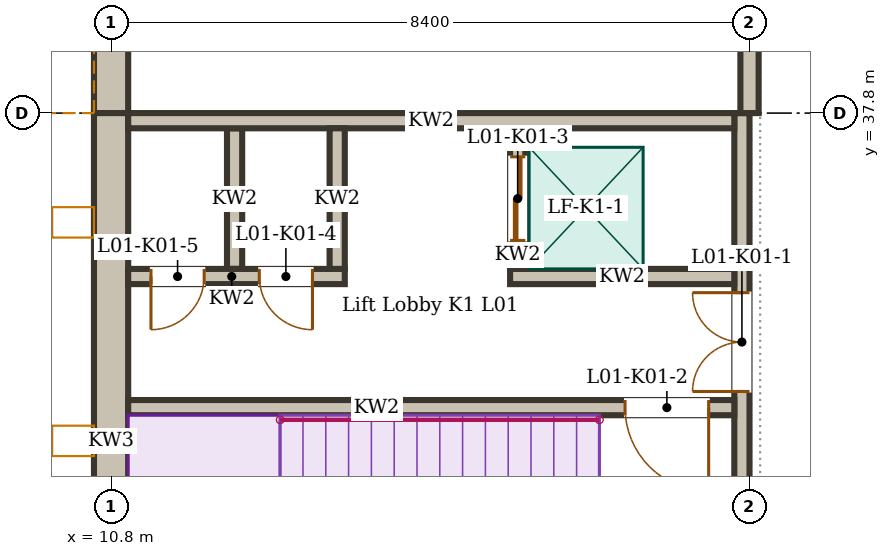
"""IFC4 building model, lengths in metres.
Left out: names, types, materials, properties, quantities, classifications, styles, units other than length and angle.
Written with IfcOpenShell. Run it as: python <this file> out.ifc"""

import sys

from ifc_helpers import new_model, si_unit, direction, frame, frame_2d, origin, place, context, subcontext, project, spatial, rectangle, extrude, element, fill, save


model = new_model("IFC4")
c1 = context("Model", 3, precision=1e-05, world=origin(), true_north=direction((0.0, 1.0)))
c2 = subcontext(c1, "Body", "Model", "MODEL_VIEW")
j1 = project(units=[si_unit("LENGTHUNIT", "METRE"), si_unit("PLANEANGLEUNIT", "RADIAN")], contexts=[c1])
p1 = place(None, origin())
s1 = spatial("IfcSite", under=j1, at=p1, CompositionType="ELEMENT")
p2 = place(p1, origin())
s2 = spatial("IfcBuilding", under=s1, at=p2, CompositionType="ELEMENT")
p3 = place(p2, frame((0.0, 0.0, 4.5)))
s3 = spatial("IfcBuildingStorey", under=s2, at=p3, CompositionType="ELEMENT", Elevation=4.5)
p4 = place(p3, frame((10.8, 37.8, 0.0), z_axis=(0.0, 0.0, 1.0), x_axis=(0.0, 1.0, 0.0)))
e1 = element("IfcWall", 1, at=p4, inside=s3, PredefinedType="SOLIDWALL", context=c2, shape_type="SweptSolid", body=[
    extrude(rectangle(XDim=8.255, YDim=0.45, at=frame_2d((4.127, 0.0))), origin(), (0.0, 0.0, 1.0), 4.05),
])
p5 = place(p4, frame((1.1, 0.0, 2.1)))
e2 = element("IfcOpeningElement", 2, at=p5, cuts=e1, PredefinedType="OPENING", context=c2, shape_type="SweptSolid", body=[
    extrude(rectangle(XDim=0.6, YDim=1.2, at=frame_2d((0.3, 0.6))), frame((0.0, 0.235, 0.0), z_axis=(0.0, -1.0, 0.0), x_axis=(1.0, 0.0, 0.0)), (0.0, 0.0, 1.0), 0.47),
])
p6 = place(p4, frame((3.9, 0.0, 2.1)))
e3 = element("IfcOpeningElement", 3, at=p6, cuts=e1, PredefinedType="OPENING", context=c2, shape_type="SweptSolid", body=[
    extrude(rectangle(XDim=0.6, YDim=1.2, at=frame_2d((0.3, 0.6))), frame((0.0, 0.235, 0.0), z_axis=(0.0, -1.0, 0.0), x_axis=(1.0, 0.0, 0.0)), (0.0, 0.0, 1.0), 0.47),
])
p7 = place(p4, frame((6.7, 0.0, 2.1)))
e4 = element("IfcOpeningElement", 4, at=p7, cuts=e1, PredefinedType="OPENING", context=c2, shape_type="SweptSolid", body=[
    extrude(rectangle(XDim=0.6, YDim=1.2, at=frame_2d((0.3, 0.6))), frame((0.0, 0.235, 0.0), z_axis=(0.0, -1.0, 0.0), x_axis=(1.0, 0.0, 0.0)), (0.0, 0.0, 1.0), 0.47),
])
p8 = place(p3, frame((19.2, 37.8, 0.0), z_axis=(0.0, 0.0, 1.0), x_axis=(0.0, 1.0, 0.0)))
e5 = element("IfcWall", 5, at=p8, inside=s3, PredefinedType="SOLIDWALL", context=c2, shape_type="SweptSolid", body=[
    extrude(rectangle(XDim=5.48, YDim=0.24, at=frame_2d((2.74, 0.0))), origin(), (0.0, 0.0, 1.0), 4.044),
])
p9 = place(p8, frame((2.2, 0.0, 0.0)))
e6 = element("IfcOpeningElement", 6, at=p9, cuts=e5, PredefinedType="OPENING", context=c2, shape_type="SweptSolid", body=[
    extrude(rectangle(XDim=1.2, YDim=2.1, at=frame_2d((0.6, 1.05))), frame((0.0, 0.13, 0.0), z_axis=(0.0, -1.0, 0.0), x_axis=(1.0, 0.0, 0.0)), (0.0, 0.0, 1.0), 0.26),
])
p10 = place(p3, frame((19.1, 29.625, 0.0), z_axis=(0.0, 0.0, 1.0), x_axis=(0.0, 1.0, 0.0)))
e7 = element("IfcWall", 7, at=p10, inside=s3, PredefinedType="SOLIDWALL", context=c2, shape_type="SweptSolid", body=[
    extrude(rectangle(XDim=8.175, YDim=0.2, at=frame_2d((4.087, 0.0))), origin(), (0.0, 0.0, 1.0), 4.5),
])
p11 = place(p10, frame((4.512, 0.0, 0.0)))
e8 = element("IfcOpeningElement", 8, at=p11, cuts=e7, PredefinedType="OPENING", context=c2, shape_type="SweptSolid", body=[
    extrude(rectangle(XDim=1.3, YDim=2.1, at=frame_2d((0.65, 1.05))), frame((0.0, 0.11, 0.0), z_axis=(0.0, -1.0, 0.0), x_axis=(1.0, 0.0, 0.0)), (0.0, 0.0, 1.0), 0.22),
])
p12 = place(p3, frame((10.8, 29.175, 0.0), z_axis=(0.0, 0.0, 1.0), x_axis=(0.0, 1.0, 0.0)))
e9 = element("IfcWall", 9, at=p12, inside=s3, PredefinedType="SOLIDWALL", context=c2, shape_type="SweptSolid", body=[
    extrude(rectangle(XDim=8.625, YDim=0.45, at=frame_2d((4.312, 0.0))), origin(), (0.0, 0.0, 1.0), 4.5),
])
p13 = place(p3, frame((19.0, 37.7, 0.0), z_axis=(0.0, 0.0, 1.0), x_axis=(-1.0, 0.0, 0.0)))
e10 = element("IfcWall", 10, at=p13, inside=s3, PredefinedType="SOLIDWALL", context=c2, shape_type="SweptSolid", body=[
    extrude(rectangle(XDim=7.975, YDim=0.2, at=frame_2d((3.988, 0.0))), origin(), (0.0, 0.0, 1.0), 4.5),
])
p14 = place(p3, frame((19.0, 33.925, 0.0), z_axis=(0.0, 0.0, 1.0), x_axis=(-1.0, 0.0, 0.0)))
e11 = element("IfcWall", 11, at=p14, inside=s3, PredefinedType="SOLIDWALL", context=c2, shape_type="SweptSolid", body=[
    extrude(rectangle(XDim=7.975, YDim=0.2, at=frame_2d((3.988, 0.0))), origin(), (0.0, 0.0, 1.0), 4.5),
])
p15 = place(p14, frame((0.337, 0.0, 0.0)))
e12 = element("IfcOpeningElement", 12, at=p15, cuts=e11, PredefinedType="OPENING", context=c2, shape_type="SweptSolid", body=[
    extrude(rectangle(XDim=1.1, YDim=2.1, at=frame_2d((0.55, 1.05))), frame((0.0, 0.11, 0.0), z_axis=(0.0, -1.0, 0.0), x_axis=(1.0, 0.0, 0.0)), (0.0, 0.0, 1.0), 0.22),
])
p16 = place(p3, frame((19.0, 35.65, 0.0), z_axis=(0.0, 0.0, 1.0), x_axis=(-1.0, 0.0, 0.0)))
e13 = element("IfcWall", 13, at=p16, inside=s3, PredefinedType="SOLIDWALL", context=c2, shape_type="SweptSolid", body=[
    extrude(rectangle(XDim=2.95, YDim=0.2, at=frame_2d((1.475, 0.0))), origin(), (0.0, 0.0, 1.0), 4.5),
])
p17 = place(p3, frame((13.875, 35.65, 0.0), z_axis=(0.0, 0.0, 1.0), x_axis=(-1.0, 0.0, 0.0)))
e14 = element("IfcWall", 14, at=p17, inside=s3, PredefinedType="SOLIDWALL", context=c2, shape_type="SweptSolid", body=[
    extrude(rectangle(XDim=2.85, YDim=0.2, at=frame_2d((1.425, 0.0))), origin(), (0.0, 0.0, 1.0), 4.3),
])
p18 = place(p17, frame((0.425, 0.0, 0.0)))
e15 = element("IfcOpeningElement", 15, at=p18, cuts=e14, PredefinedType="OPENING", context=c2, shape_type="SweptSolid", body=[
    extrude(rectangle(XDim=0.7, YDim=2.1, at=frame_2d((0.35, 1.05))), frame((0.0, 0.11, 0.0), z_axis=(0.0, -1.0, 0.0), x_axis=(1.0, 0.0, 0.0)), (0.0, 0.0, 1.0), 0.22),
])
p19 = place(p17, frame((1.85, 0.0, 0.0)))
e16 = element("IfcOpeningElement", 16, at=p19, cuts=e14, PredefinedType="OPENING", context=c2, shape_type="SweptSolid", body=[
    extrude(rectangle(XDim=0.7, YDim=2.1, at=frame_2d((0.35, 1.05))), frame((0.0, 0.11, 0.0), z_axis=(0.0, -1.0, 0.0), x_axis=(1.0, 0.0, 0.0)), (0.0, 0.0, 1.0), 0.22),
])
p20 = place(p3, frame((16.15, 35.75, 0.0), z_axis=(0.0, 0.0, 1.0), x_axis=(0.0, 1.0, 0.0)))
e17 = element("IfcWall", 17, at=p20, inside=s3, PredefinedType="SOLIDWALL", context=c2, shape_type="SweptSolid", body=[
    extrude(rectangle(XDim=1.85, YDim=0.2, at=frame_2d((0.925, 0.0))), origin(), (0.0, 0.0, 1.0), 4.5),
])
p21 = place(p20, frame((0.375, 0.0, 0.0)))
e18 = element("IfcOpeningElement", 18, at=p21, cuts=e17, PredefinedType="OPENING", context=c2, shape_type="SweptSolid", body=[
    extrude(rectangle(XDim=1.1, YDim=2.1, at=frame_2d((0.55, 1.05))), frame((0.0, 0.11, 0.0), z_axis=(0.0, -1.0, 0.0), x_axis=(1.0, 0.0, 0.0)), (0.0, 0.0, 1.0), 0.22),
])
for number, where, z_axis, x_axis in (
    (19, (13.775, 35.75, 0.0), (0.0, 0.0, 1.0), (0.0, 1.0, 0.0)),
    (20, (12.425, 35.75, 0.0), (0.0, 0.0, 1.0), (0.0, 1.0, 0.0)),
):
    element("IfcWall", number, at=place(p3, frame(where, z_axis=z_axis, x_axis=x_axis)), inside=s3, PredefinedType="SOLIDWALL", context=c2, shape_type="SweptSolid", body=[
        extrude(rectangle(XDim=1.85, YDim=0.2, at=frame_2d((0.925, 0.0))), origin(), (0.0, 0.0, 1.0), 4.3),
    ])
p22 = place(p11, origin())
e21 = element("IfcDoor", 21, at=p22, inside=s3, OperationType="DOUBLE_DOOR_DOUBLE_SWING", PredefinedType="DOOR", context=c2, shape_type="SweptSolid", body=[
    extrude(rectangle(XDim=1.3, YDim=2.1, at=frame_2d((0.65, 1.05))), frame((0.0, 0.025, 0.0), z_axis=(0.0, -1.0, 0.0), x_axis=(1.0, 0.0, 0.0)), (0.0, 0.0, 1.0), 0.05),
])
fill(e8, e21)
p23 = place(p15, origin())
e22 = element("IfcDoor", 22, at=p23, inside=s3, OperationType="SINGLE_SWING_LEFT", PredefinedType="DOOR", context=c2, shape_type="SweptSolid", body=[
    extrude(rectangle(XDim=1.1, YDim=2.1, at=frame_2d((0.55, 1.05))), frame((0.0, 0.025, 0.0), z_axis=(0.0, -1.0, 0.0), x_axis=(1.0, 0.0, 0.0)), (0.0, 0.0, 1.0), 0.05),
])
fill(e12, e22)
p24 = place(p21, origin())
e23 = element("IfcDoor", 23, at=p24, inside=s3, OperationType="DOUBLE_DOOR_SLIDING", PredefinedType="DOOR", context=c2, shape_type="SweptSolid", body=[
    extrude(rectangle(XDim=1.1, YDim=2.1, at=frame_2d((0.55, 1.05))), frame((0.0, 0.025, 0.0), z_axis=(0.0, -1.0, 0.0), x_axis=(1.0, 0.0, 0.0)), (0.0, 0.0, 1.0), 0.05),
])
fill(e18, e23)
p25 = place(p18, origin())
e24 = element("IfcDoor", 24, at=p25, inside=s3, OperationType="SINGLE_SWING_LEFT", PredefinedType="DOOR", context=c2, shape_type="SweptSolid", body=[
    extrude(rectangle(XDim=0.7, YDim=2.1, at=frame_2d((0.35, 1.05))), frame((0.0, 0.025, 0.0), z_axis=(0.0, -1.0, 0.0), x_axis=(1.0, 0.0, 0.0)), (0.0, 0.0, 1.0), 0.05),
])
fill(e15, e24)
p26 = place(p19, origin())
e25 = element("IfcDoor", 25, at=p26, inside=s3, OperationType="SINGLE_SWING_RIGHT", PredefinedType="DOOR", context=c2, shape_type="SweptSolid", body=[
    extrude(rectangle(XDim=0.7, YDim=2.1, at=frame_2d((0.35, 1.05))), frame((0.0, 0.025, 0.0), z_axis=(0.0, -1.0, 0.0), x_axis=(1.0, 0.0, 0.0)), (0.0, 0.0, 1.0), 0.05),
])
fill(e16, e25)
save(model, sys.argv[1])
